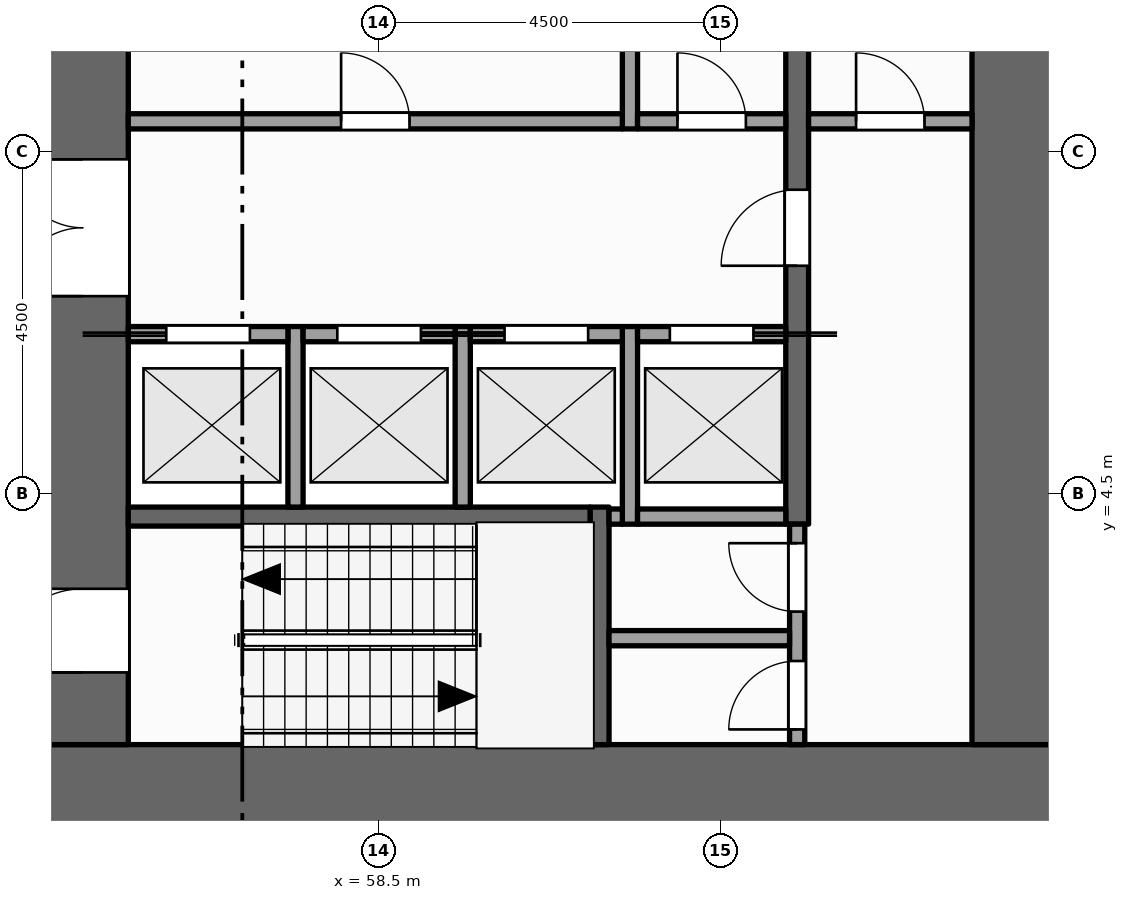
"""IFC4 building model, lengths in metres.
Left out: names, types, materials, properties, quantities, classifications, styles, units other than length and angle.
Written with IfcOpenShell. Run it as: python <this file> out.ifc"""

import sys

from ifc_helpers import new_model, si_unit, direction, frame, frame_2d, origin, place, context, subcontext, project, spatial, rectangle, extrude, element, fill, save


model = new_model("IFC4")
c1 = context("Model", 3, precision=1e-05, world=origin(), true_north=direction((0.0, 1.0)))
c2 = subcontext(c1, "Body", "Model", "MODEL_VIEW")
j1 = project(units=[si_unit("LENGTHUNIT", "METRE"), si_unit("PLANEANGLEUNIT", "RADIAN")], contexts=[c1])
p1 = place(None, origin())
s1 = spatial("IfcSite", under=j1, at=p1, CompositionType="ELEMENT")
p2 = place(p1, origin())
s2 = spatial("IfcBuilding", under=s1, at=p2, CompositionType="ELEMENT")
p3 = place(p2, frame((0.0, 0.0, 127.0)))
s3 = spatial("IfcBuildingStorey", under=s2, at=p3, CompositionType="ELEMENT", Elevation=127.0)
p4 = place(p3, frame((67.5, 0.6, -0.15), z_axis=(0.0, 0.0, 1.0), x_axis=(-1.0, 0.0, 0.0)))
e1 = element("IfcWall", 1, at=p4, inside=s3, PredefinedType="SHEAR", context=c2, shape_type="SweptSolid", body=[
    extrude(rectangle(XDim=13.5, YDim=1.2, at=frame_2d((6.75, 0.0))), origin(), (0.0, 0.0, 1.0), 4.0),
])
p5 = place(p3, frame((54.6, 1.2, -0.15), z_axis=(0.0, 0.0, 1.0), x_axis=(0.0, 1.0, 0.0)))
e2 = element("IfcWall", 2, at=p5, inside=s3, PredefinedType="SHEAR", context=c2, shape_type="SweptSolid", body=[
    extrude(rectangle(XDim=20.1, YDim=1.2, at=frame_2d((10.05, 0.0))), origin(), (0.0, 0.0, 1.0), 4.0),
])
p6 = place(p5, frame((5.9, 0.0, 0.15)))
e3 = element("IfcOpeningElement", 3, at=p6, cuts=e2, PredefinedType="OPENING", context=c2, shape_type="SweptSolid", body=[
    extrude(rectangle(XDim=1.8, YDim=2.1, at=frame_2d((0.9, 1.05))), frame((0.0, 0.61, 0.0), z_axis=(0.0, -1.0, 0.0), x_axis=(1.0, 0.0, 0.0)), (0.0, 0.0, 1.0), 1.22),
])
p7 = place(p5, frame((11.95, 0.0, 0.15)))
e4 = element("IfcOpeningElement", 4, at=p7, cuts=e2, PredefinedType="OPENING", context=c2, shape_type="SweptSolid", body=[
    extrude(rectangle(XDim=1.1, YDim=2.1, at=frame_2d((0.55, 1.05))), frame((0.0, 0.61, 0.0), z_axis=(0.0, -1.0, 0.0), x_axis=(1.0, 0.0, 0.0)), (0.0, 0.0, 1.0), 1.22),
])
p8 = place(p5, frame((0.95, 0.0, 0.15)))
e5 = element("IfcOpeningElement", 5, at=p8, cuts=e2, PredefinedType="OPENING", context=c2, shape_type="SweptSolid", body=[
    extrude(rectangle(XDim=1.1, YDim=2.1, at=frame_2d((0.55, 1.05))), frame((0.0, 0.61, 0.0), z_axis=(0.0, -1.0, 0.0), x_axis=(1.0, 0.0, 0.0)), (0.0, 0.0, 1.0), 1.22),
])
p9 = place(p5, frame((18.15, 0.0, 0.15)))
e6 = element("IfcOpeningElement", 6, at=p9, cuts=e2, PredefinedType="OPENING", context=c2, shape_type="SweptSolid", body=[
    extrude(rectangle(XDim=1.1, YDim=2.1, at=frame_2d((0.55, 1.05))), frame((0.0, 0.61, 0.0), z_axis=(0.0, -1.0, 0.0), x_axis=(1.0, 0.0, 0.0)), (0.0, 0.0, 1.0), 1.22),
])
p10 = place(p3, frame((66.9, 1.2, -0.15), z_axis=(0.0, 0.0, 1.0), x_axis=(0.0, 1.0, 0.0)))
e7 = element("IfcWall", 7, at=p10, inside=s3, PredefinedType="SHEAR", context=c2, shape_type="SweptSolid", body=[
    extrude(rectangle(XDim=20.1, YDim=1.2, at=frame_2d((10.05, 0.0))), origin(), (0.0, 0.0, 1.0), 4.0),
])
for number, where, z_axis, x_axis in (
    (8, (57.4, 4.325, 0.0), (0.0, 0.0, 1.0), (0.0, 1.0, 0.0)),
    (9, (59.6, 4.325, 0.0), (0.0, 0.0, 1.0), (0.0, 1.0, 0.0)),
):
    element("IfcWall", number, at=place(p3, frame(where, z_axis=z_axis, x_axis=x_axis)), inside=s3, PredefinedType="SOLIDWALL", context=c2, shape_type="SweptSolid", body=[
        extrude(rectangle(XDim=2.375, YDim=0.2, at=frame_2d((1.188, 0.0))), origin(), (0.0, 0.0, 1.0), 3.75),
    ])
p11 = place(p3, frame((61.4, 1.2, 0.0), z_axis=(0.0, 0.0, 1.0), x_axis=(0.0, 1.0, 0.0)))
e10 = element("IfcWall", 10, at=p11, inside=s3, PredefinedType="SHEAR", context=c2, shape_type="SweptSolid", body=[
    extrude(rectangle(XDim=3.125, YDim=0.25, at=frame_2d((1.562, 0.0))), origin(), (0.0, 0.0, 1.0), 3.75),
])
p12 = place(p3, frame((61.8, 4.1, 0.0), z_axis=(0.0, 0.0, 1.0), x_axis=(0.0, 1.0, 0.0)))
e11 = element("IfcWall", 11, at=p12, inside=s3, PredefinedType="SOLIDWALL", context=c2, shape_type="SweptSolid", body=[
    extrude(rectangle(XDim=2.6, YDim=0.2, at=frame_2d((1.3, 0.0))), origin(), (0.0, 0.0, 1.0), 3.75),
])
p13 = place(p3, frame((61.8, 9.3, 0.0), z_axis=(0.0, 0.0, 1.0), x_axis=(0.0, 1.0, 0.0)))
e12 = element("IfcWall", 12, at=p13, inside=s3, PredefinedType="PARTITIONING", context=c2, shape_type="SweptSolid", body=[
    extrude(rectangle(XDim=2.6, YDim=0.2, at=frame_2d((1.3, 0.0))), origin(), (0.0, 0.0, 1.0), 3.75),
])
p14 = place(p3, frame((64.0, 1.2, 0.0), z_axis=(0.0, 0.0, 1.0), x_axis=(0.0, 1.0, 0.0)))
e13 = element("IfcWall", 13, at=p14, inside=s3, PredefinedType="PARTITIONING", context=c2, shape_type="SweptSolid", body=[
    extrude(rectangle(XDim=2.9, YDim=0.2, at=frame_2d((1.45, 0.0))), origin(), (0.0, 0.0, 1.0), 3.75),
])
p15 = place(p14, frame((0.2, 0.0, 0.0)))
e14 = element("IfcOpeningElement", 14, at=p15, cuts=e13, PredefinedType="OPENING", context=c2, shape_type="SweptSolid", body=[
    extrude(rectangle(XDim=0.9, YDim=2.1, at=frame_2d((0.45, 1.05))), frame((0.0, 0.11, 0.0), z_axis=(0.0, -1.0, 0.0), x_axis=(1.0, 0.0, 0.0)), (0.0, 0.0, 1.0), 0.22),
])
p16 = place(p14, frame((1.75, 0.0, 0.0)))
e15 = element("IfcOpeningElement", 15, at=p16, cuts=e13, PredefinedType="OPENING", context=c2, shape_type="SweptSolid", body=[
    extrude(rectangle(XDim=0.9, YDim=2.1, at=frame_2d((0.45, 1.05))), frame((0.0, 0.11, 0.0), z_axis=(0.0, -1.0, 0.0), x_axis=(1.0, 0.0, 0.0)), (0.0, 0.0, 1.0), 0.22),
])
p17 = place(p3, frame((64.0, 4.1, 0.0), z_axis=(0.0, 0.0, 1.0), x_axis=(0.0, 1.0, 0.0)))
e16 = element("IfcWall", 16, at=p17, inside=s3, PredefinedType="SHEAR", context=c2, shape_type="SweptSolid", body=[
    extrude(rectangle(XDim=14.5, YDim=0.3, at=frame_2d((7.25, 0.0))), origin(), (0.0, 0.0, 1.0), 3.75),
])
p18 = place(p17, frame((3.4, 0.0, 0.0)))
e17 = element("IfcOpeningElement", 17, at=p18, cuts=e16, PredefinedType="OPENING", context=c2, shape_type="SweptSolid", body=[
    extrude(rectangle(XDim=1.0, YDim=2.1, at=frame_2d((0.5, 1.05))), frame((0.0, 0.16, 0.0), z_axis=(0.0, -1.0, 0.0), x_axis=(1.0, 0.0, 0.0)), (0.0, 0.0, 1.0), 0.32),
])
p19 = place(p17, frame((9.1, 0.0, 0.0)))
e18 = element("IfcOpeningElement", 18, at=p19, cuts=e16, PredefinedType="OPENING", context=c2, shape_type="SweptSolid", body=[
    extrude(rectangle(XDim=1.0, YDim=2.1, at=frame_2d((0.5, 1.05))), frame((0.0, 0.16, 0.0), z_axis=(0.0, -1.0, 0.0), x_axis=(1.0, 0.0, 0.0)), (0.0, 0.0, 1.0), 0.32),
])
p20 = place(p3, frame((61.525, 2.6, 0.0), z_axis=(0.0, 0.0, 1.0), x_axis=(1.0, 0.0, 0.0)))
e19 = element("IfcWall", 19, at=p20, inside=s3, PredefinedType="PARTITIONING", context=c2, shape_type="SweptSolid", body=[
    extrude(rectangle(XDim=2.375, YDim=0.2, at=frame_2d((1.188, 0.0))), origin(), (0.0, 0.0, 1.0), 3.75),
])
p21 = place(p3, frame((55.2, 4.2, 0.0), z_axis=(0.0, 0.0, 1.0), x_axis=(1.0, 0.0, 0.0)))
e20 = element("IfcWall", 20, at=p21, inside=s3, PredefinedType="SHEAR", context=c2, shape_type="SweptSolid", body=[
    extrude(rectangle(XDim=6.075, YDim=0.25, at=frame_2d((3.038, 0.0))), origin(), (0.0, 0.0, 1.0), 3.75),
])
p22 = place(p3, frame((61.525, 4.2, 0.0), z_axis=(0.0, 0.0, 1.0), x_axis=(1.0, 0.0, 0.0)))
e21 = element("IfcWall", 21, at=p22, inside=s3, PredefinedType="SOLIDWALL", context=c2, shape_type="SweptSolid", body=[
    extrude(rectangle(XDim=0.175, YDim=0.2, at=frame_2d((0.087, 0.0))), origin(), (0.0, 0.0, 1.0), 3.75),
])
p23 = place(p3, frame((61.9, 4.2, 0.0), z_axis=(0.0, 0.0, 1.0), x_axis=(1.0, 0.0, 0.0)))
e22 = element("IfcWall", 22, at=p23, inside=s3, PredefinedType="SOLIDWALL", context=c2, shape_type="SweptSolid", body=[
    extrude(rectangle(XDim=1.95, YDim=0.2, at=frame_2d((0.975, 0.0))), origin(), (0.0, 0.0, 1.0), 3.75),
])
p24 = place(p3, frame((55.2, 6.6, 0.0), z_axis=(0.0, 0.0, 1.0), x_axis=(1.0, 0.0, 0.0)))
e23 = element("IfcWall", 23, at=p24, inside=s3, PredefinedType="SOLIDWALL", context=c2, shape_type="SweptSolid", body=[
    extrude(rectangle(XDim=2.1, YDim=0.2, at=frame_2d((1.05, 0.0))), origin(), (0.0, 0.0, 1.0), 3.75),
])
p25 = place(p24, frame((0.5, 0.0, 0.012)))
e24 = element("IfcOpeningElement", 24, at=p25, cuts=e23, PredefinedType="OPENING", context=c2, shape_type="SweptSolid", body=[
    extrude(rectangle(XDim=1.1, YDim=2.1, at=frame_2d((0.55, 1.05))), frame((0.0, 0.11, 0.0), z_axis=(0.0, -1.0, 0.0), x_axis=(1.0, 0.0, 0.0)), (0.0, 0.0, 1.0), 0.22),
])
p26 = place(p3, frame((57.5, 6.6, 0.0), z_axis=(0.0, 0.0, 1.0), x_axis=(1.0, 0.0, 0.0)))
e25 = element("IfcWall", 25, at=p26, inside=s3, PredefinedType="SOLIDWALL", context=c2, shape_type="SweptSolid", body=[
    extrude(rectangle(XDim=2.0, YDim=0.2, at=frame_2d((1.0, 0.0))), origin(), (0.0, 0.0, 1.0), 3.75),
])
p27 = place(p26, frame((0.45, 0.0, 0.012)))
e26 = element("IfcOpeningElement", 26, at=p27, cuts=e25, PredefinedType="OPENING", context=c2, shape_type="SweptSolid", body=[
    extrude(rectangle(XDim=1.1, YDim=2.1, at=frame_2d((0.55, 1.05))), frame((0.0, 0.11, 0.0), z_axis=(0.0, -1.0, 0.0), x_axis=(1.0, 0.0, 0.0)), (0.0, 0.0, 1.0), 0.22),
])
p28 = place(p3, frame((59.7, 6.6, 0.0), z_axis=(0.0, 0.0, 1.0), x_axis=(1.0, 0.0, 0.0)))
e27 = element("IfcWall", 27, at=p28, inside=s3, PredefinedType="SOLIDWALL", context=c2, shape_type="SweptSolid", body=[
    extrude(rectangle(XDim=2.0, YDim=0.2, at=frame_2d((1.0, 0.0))), origin(), (0.0, 0.0, 1.0), 3.75),
])
p29 = place(p28, frame((0.45, 0.0, 0.012)))
e28 = element("IfcOpeningElement", 28, at=p29, cuts=e27, PredefinedType="OPENING", context=c2, shape_type="SweptSolid", body=[
    extrude(rectangle(XDim=1.1, YDim=2.1, at=frame_2d((0.55, 1.05))), frame((0.0, 0.11, 0.0), z_axis=(0.0, -1.0, 0.0), x_axis=(1.0, 0.0, 0.0)), (0.0, 0.0, 1.0), 0.22),
])
p30 = place(p3, frame((61.9, 6.6, 0.0), z_axis=(0.0, 0.0, 1.0), x_axis=(1.0, 0.0, 0.0)))
e29 = element("IfcWall", 29, at=p30, inside=s3, PredefinedType="SOLIDWALL", context=c2, shape_type="SweptSolid", body=[
    extrude(rectangle(XDim=1.95, YDim=0.2, at=frame_2d((0.975, 0.0))), origin(), (0.0, 0.0, 1.0), 3.75),
])
p31 = place(p30, frame((0.425, 0.0, 0.012)))
e30 = element("IfcOpeningElement", 30, at=p31, cuts=e29, PredefinedType="OPENING", context=c2, shape_type="SweptSolid", body=[
    extrude(rectangle(XDim=1.1, YDim=2.1, at=frame_2d((0.55, 1.05))), frame((0.0, 0.11, 0.0), z_axis=(0.0, -1.0, 0.0), x_axis=(1.0, 0.0, 0.0)), (0.0, 0.0, 1.0), 0.22),
])
p32 = place(p3, frame((55.2, 9.4, 0.0), z_axis=(0.0, 0.0, 1.0), x_axis=(1.0, 0.0, 0.0)))
e31 = element("IfcWall", 31, at=p32, inside=s3, PredefinedType="PARTITIONING", context=c2, shape_type="SweptSolid", body=[
    extrude(rectangle(XDim=6.5, YDim=0.2, at=frame_2d((3.25, 0.0))), origin(), (0.0, 0.0, 1.0), 3.75),
])
p33 = place(p32, frame((2.8, 0.0, 0.0)))
e32 = element("IfcOpeningElement", 32, at=p33, cuts=e31, PredefinedType="OPENING", context=c2, shape_type="SweptSolid", body=[
    extrude(rectangle(XDim=0.9, YDim=2.1, at=frame_2d((0.45, 1.05))), frame((0.0, 0.11, 0.0), z_axis=(0.0, -1.0, 0.0), x_axis=(1.0, 0.0, 0.0)), (0.0, 0.0, 1.0), 0.22),
])
p34 = place(p3, frame((61.9, 9.4, 0.0), z_axis=(0.0, 0.0, 1.0), x_axis=(1.0, 0.0, 0.0)))
e33 = element("IfcWall", 33, at=p34, inside=s3, PredefinedType="PARTITIONING", context=c2, shape_type="SweptSolid", body=[
    extrude(rectangle(XDim=1.95, YDim=0.2, at=frame_2d((0.975, 0.0))), origin(), (0.0, 0.0, 1.0), 3.75),
])
p35 = place(p34, frame((0.525, 0.0, 0.0)))
e34 = element("IfcOpeningElement", 34, at=p35, cuts=e33, PredefinedType="OPENING", context=c2, shape_type="SweptSolid", body=[
    extrude(rectangle(XDim=0.9, YDim=2.1, at=frame_2d((0.45, 1.05))), frame((0.0, 0.11, 0.0), z_axis=(0.0, -1.0, 0.0), x_axis=(1.0, 0.0, 0.0)), (0.0, 0.0, 1.0), 0.22),
])
p36 = place(p3, frame((64.15, 9.4, 0.0), z_axis=(0.0, 0.0, 1.0), x_axis=(1.0, 0.0, 0.0)))
e35 = element("IfcWall", 35, at=p36, inside=s3, PredefinedType="PARTITIONING", context=c2, shape_type="SweptSolid", body=[
    extrude(rectangle(XDim=2.15, YDim=0.2, at=frame_2d((1.075, 0.0))), origin(), (0.0, 0.0, 1.0), 3.75),
])
p37 = place(p36, frame((0.625, 0.0, 0.0)))
e36 = element("IfcOpeningElement", 36, at=p37, cuts=e35, PredefinedType="OPENING", context=c2, shape_type="SweptSolid", body=[
    extrude(rectangle(XDim=0.9, YDim=2.1, at=frame_2d((0.45, 1.05))), frame((0.0, 0.11, 0.0), z_axis=(0.0, -1.0, 0.0), x_axis=(1.0, 0.0, 0.0)), (0.0, 0.0, 1.0), 0.22),
])
p38 = place(p25, origin())
e37 = element("IfcDoor", 37, at=p38, inside=s3, OperationType="SLIDING_TO_LEFT", PredefinedType="DOOR", context=c2, shape_type="SweptSolid", body=[
    extrude(rectangle(XDim=1.1, YDim=2.1, at=frame_2d((0.55, 1.05))), frame((0.0, 0.025, 0.0), z_axis=(0.0, -1.0, 0.0), x_axis=(1.0, 0.0, 0.0)), (0.0, 0.0, 1.0), 0.05),
])
fill(e24, e37)
p39 = place(p27, origin())
e38 = element("IfcDoor", 38, at=p39, inside=s3, OperationType="SLIDING_TO_RIGHT", PredefinedType="DOOR", context=c2, shape_type="SweptSolid", body=[
    extrude(rectangle(XDim=1.1, YDim=2.1, at=frame_2d((0.55, 1.05))), frame((0.0, 0.025, 0.0), z_axis=(0.0, -1.0, 0.0), x_axis=(1.0, 0.0, 0.0)), (0.0, 0.0, 1.0), 0.05),
])
fill(e26, e38)
p40 = place(p29, origin())
e39 = element("IfcDoor", 39, at=p40, inside=s3, OperationType="SLIDING_TO_LEFT", PredefinedType="DOOR", context=c2, shape_type="SweptSolid", body=[
    extrude(rectangle(XDim=1.1, YDim=2.1, at=frame_2d((0.55, 1.05))), frame((0.0, 0.025, 0.0), z_axis=(0.0, -1.0, 0.0), x_axis=(1.0, 0.0, 0.0)), (0.0, 0.0, 1.0), 0.05),
])
fill(e28, e39)
p41 = place(p31, origin())
e40 = element("IfcDoor", 40, at=p41, inside=s3, OperationType="SLIDING_TO_RIGHT", PredefinedType="DOOR", context=c2, shape_type="SweptSolid", body=[
    extrude(rectangle(XDim=1.1, YDim=2.1, at=frame_2d((0.55, 1.05))), frame((0.0, 0.025, 0.0), z_axis=(0.0, -1.0, 0.0), x_axis=(1.0, 0.0, 0.0)), (0.0, 0.0, 1.0), 0.05),
])
fill(e30, e40)
p42 = place(p6, origin())
e41 = element("IfcDoor", 41, at=p42, inside=s3, OperationType="DOUBLE_DOOR_SINGLE_SWING", PredefinedType="DOOR", context=c2, shape_type="SweptSolid", body=[
    extrude(rectangle(XDim=1.8, YDim=2.1, at=frame_2d((0.9, 1.05))), frame((0.0, 0.025, 0.0), z_axis=(0.0, -1.0, 0.0), x_axis=(1.0, 0.0, 0.0)), (0.0, 0.0, 1.0), 0.05),
])
fill(e3, e41)
p43 = place(p18, origin())
e42 = element("IfcDoor", 42, at=p43, inside=s3, OperationType="SINGLE_SWING_LEFT", PredefinedType="DOOR", context=c2, shape_type="SweptSolid", body=[
    extrude(rectangle(XDim=1.0, YDim=2.1, at=frame_2d((0.5, 1.05))), frame((0.0, 0.025, 0.0), z_axis=(0.0, -1.0, 0.0), x_axis=(1.0, 0.0, 0.0)), (0.0, 0.0, 1.0), 0.05),
])
fill(e17, e42)
p44 = place(p37, origin())
e43 = element("IfcDoor", 43, at=p44, inside=s3, OperationType="SINGLE_SWING_LEFT", PredefinedType="DOOR", context=c2, shape_type="SweptSolid", body=[
    extrude(rectangle(XDim=0.9, YDim=2.1, at=frame_2d((0.45, 1.05))), frame((0.0, 0.025, 0.0), z_axis=(0.0, -1.0, 0.0), x_axis=(1.0, 0.0, 0.0)), (0.0, 0.0, 1.0), 0.05),
])
fill(e36, e43)
p45 = place(p8, origin())
e44 = element("IfcDoor", 44, at=p45, inside=s3, OperationType="SINGLE_SWING_LEFT", PredefinedType="DOOR", context=c2, shape_type="SweptSolid", body=[
    extrude(rectangle(XDim=1.1, YDim=2.1, at=frame_2d((0.55, 1.05))), frame((0.0, 0.025, 0.0), z_axis=(0.0, -1.0, 0.0), x_axis=(1.0, 0.0, 0.0)), (0.0, 0.0, 1.0), 0.05),
])
fill(e5, e44)
p46 = place(p15, origin())
e45 = element("IfcDoor", 45, at=p46, inside=s3, OperationType="SINGLE_SWING_LEFT", PredefinedType="DOOR", context=c2, shape_type="SweptSolid", body=[
    extrude(rectangle(XDim=0.9, YDim=2.1, at=frame_2d((0.45, 1.05))), frame((0.0, 0.025, 0.0), z_axis=(0.0, -1.0, 0.0), x_axis=(1.0, 0.0, 0.0)), (0.0, 0.0, 1.0), 0.05),
])
fill(e14, e45)
p47 = place(p16, origin())
e46 = element("IfcDoor", 46, at=p47, inside=s3, OperationType="SINGLE_SWING_RIGHT", PredefinedType="DOOR", context=c2, shape_type="SweptSolid", body=[
    extrude(rectangle(XDim=0.9, YDim=2.1, at=frame_2d((0.45, 1.05))), frame((0.0, 0.025, 0.0), z_axis=(0.0, -1.0, 0.0), x_axis=(1.0, 0.0, 0.0)), (0.0, 0.0, 1.0), 0.05),
])
fill(e15, e46)
p48 = place(p33, origin())
e47 = element("IfcDoor", 47, at=p48, inside=s3, OperationType="SINGLE_SWING_LEFT", PredefinedType="DOOR", context=c2, shape_type="SweptSolid", body=[
    extrude(rectangle(XDim=0.9, YDim=2.1, at=frame_2d((0.45, 1.05))), frame((0.0, 0.025, 0.0), z_axis=(0.0, -1.0, 0.0), x_axis=(1.0, 0.0, 0.0)), (0.0, 0.0, 1.0), 0.05),
])
fill(e32, e47)
p49 = place(p35, origin())
e48 = element("IfcDoor", 48, at=p49, inside=s3, OperationType="SINGLE_SWING_LEFT", PredefinedType="DOOR", context=c2, shape_type="SweptSolid", body=[
    extrude(rectangle(XDim=0.9, YDim=2.1, at=frame_2d((0.45, 1.05))), frame((0.0, 0.025, 0.0), z_axis=(0.0, -1.0, 0.0), x_axis=(1.0, 0.0, 0.0)), (0.0, 0.0, 1.0), 0.05),
])
fill(e34, e48)
save(model, sys.argv[1])
